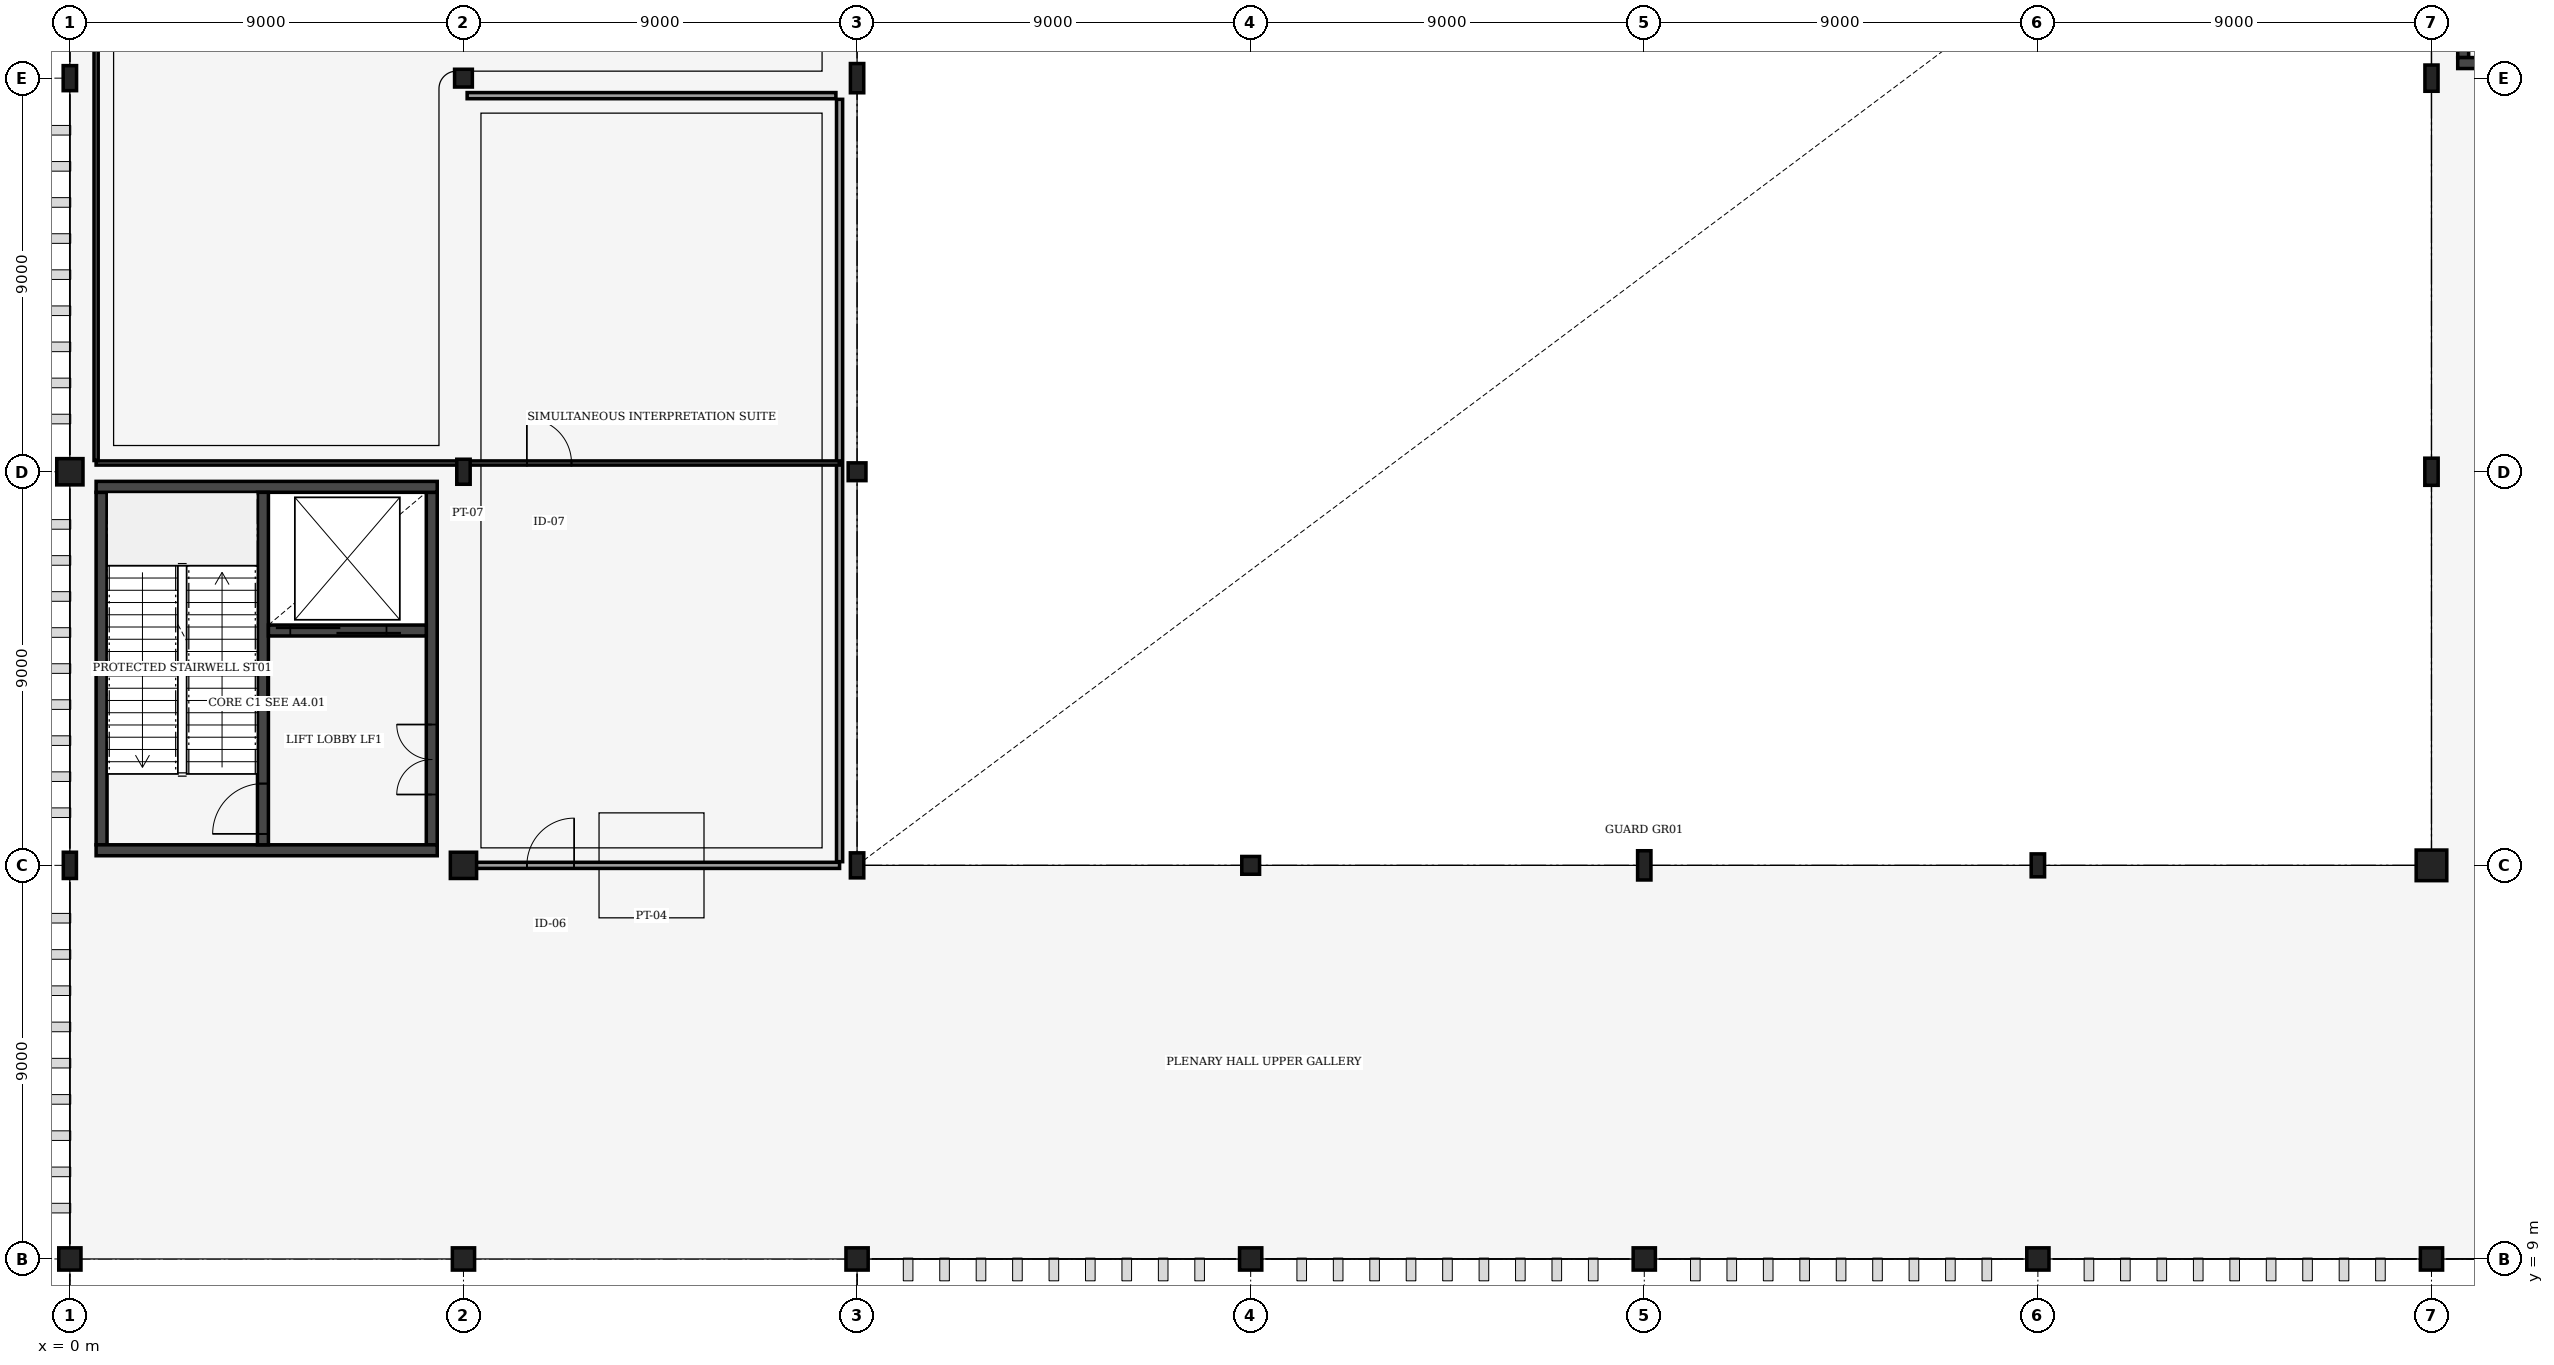
"""IFC4 building model, lengths in metres.
Left out: names, types, materials, properties, quantities, classifications, styles, units other than length and angle.
Written with IfcOpenShell. Run it as: python <this file> out.ifc"""

import sys

from ifc_helpers import new_model, si_unit, direction, frame, frame_2d, origin, origin_2d, place, context, subcontext, project, spatial, rectangle, hollow_circle, i_section, extrude, element, fill, save


model = new_model("IFC4")
c1 = context("Model", 3, precision=1e-05, world=origin(), true_north=direction((0.0, 1.0)))
c2 = subcontext(c1, "Body", "Model", "MODEL_VIEW")
j1 = project(units=[si_unit("LENGTHUNIT", "METRE"), si_unit("PLANEANGLEUNIT", "RADIAN")], contexts=[c1])
p1 = place(None, origin())
s1 = spatial("IfcSite", under=j1, at=p1, CompositionType="ELEMENT")
p2 = place(p1, origin())
s2 = spatial("IfcBuilding", under=s1, at=p2, CompositionType="ELEMENT")
p3 = place(p2, frame((0.0, 0.0, 6.0)))
s3 = spatial("IfcBuildingStorey", under=s2, at=p3, CompositionType="ELEMENT", Elevation=6.0)
p4 = place(p3, frame((0.0, 9.0, 0.0), z_axis=(0.0, 0.0, 1.0), x_axis=(1.0, 0.0, 0.0)))
e1 = element("IfcColumn", 1, at=p4, inside=s3, PredefinedType="COLUMN", context=c2, shape_type="SweptSolid", body=[
    extrude(hollow_circle(Radius=0.254, WallThickness=0.02, at=origin_2d()), origin(), (0.0, 0.0, 1.0), 6.0),
])
p5 = place(p3, frame((0.0, 18.0, 0.0), z_axis=(0.0, 0.0, 1.0), x_axis=(1.0, 0.0, 0.0)))
e2 = element("IfcColumn", 2, at=p5, inside=s3, PredefinedType="COLUMN", context=c2, shape_type="SweptSolid", body=[
    extrude(i_section(OverallWidth=0.3, OverallDepth=0.6, WebThickness=0.015, FlangeThickness=0.03, FilletRadius=0.027, at=origin_2d()), origin(), (0.0, 0.0, 1.0), 6.0),
])
p6 = place(p3, frame((0.0, 27.0, 0.0), z_axis=(0.0, 0.0, 1.0), x_axis=(1.0, 0.0, 0.0)))
e3 = element("IfcColumn", 3, at=p6, inside=s3, PredefinedType="COLUMN", context=c2, shape_type="SweptSolid", body=[
    extrude(rectangle(XDim=0.6, YDim=0.6, at=origin_2d()), origin(), (0.0, 0.0, 1.0), 6.0),
])
p7 = place(p3, frame((0.0, 36.0, 0.0), z_axis=(0.0, 0.0, 1.0), x_axis=(1.0, 0.0, 0.0)))
e4 = element("IfcColumn", 4, at=p7, inside=s3, PredefinedType="COLUMN", context=c2, shape_type="SweptSolid", body=[
    extrude(i_section(OverallWidth=0.306, OverallDepth=0.572, WebThickness=0.021, FlangeThickness=0.04, FilletRadius=0.027, at=origin_2d()), origin(), (0.0, 0.0, 1.0), 6.0),
])
p8 = place(p3, frame((9.0, 9.0, 0.0), z_axis=(0.0, 0.0, 1.0), x_axis=(1.0, 0.0, 0.0)))
e5 = element("IfcColumn", 5, at=p8, inside=s3, PredefinedType="COLUMN", context=c2, shape_type="SweptSolid", body=[
    extrude(hollow_circle(Radius=0.254, WallThickness=0.02, at=origin_2d()), origin(), (0.0, 0.0, 1.0), 6.0),
])
p9 = place(p3, frame((9.0, 18.0, 0.0), z_axis=(0.0, 0.0, 1.0), x_axis=(1.0, 0.0, 0.0)))
e6 = element("IfcColumn", 6, at=p9, inside=s3, PredefinedType="COLUMN", context=c2, shape_type="SweptSolid", body=[
    extrude(rectangle(XDim=0.6, YDim=0.6, at=origin_2d()), origin(), (0.0, 0.0, 1.0), 6.0),
])
p10 = place(p3, frame((9.0, 27.0, 0.0), z_axis=(0.0, 0.0, 1.0), x_axis=(1.0, 0.0, 0.0)))
e7 = element("IfcColumn", 7, at=p10, inside=s3, PredefinedType="COLUMN", context=c2, shape_type="SweptSolid", body=[
    extrude(i_section(OverallWidth=0.306, OverallDepth=0.572, WebThickness=0.021, FlangeThickness=0.04, FilletRadius=0.027, at=origin_2d()), origin(), (0.0, 0.0, 1.0), 6.0),
])
p11 = place(p3, frame((9.0, 36.0, 0.0), z_axis=(0.0, 0.0, 1.0), x_axis=(1.0, 0.0, 0.0)))
e8 = element("IfcColumn", 8, at=p11, inside=s3, PredefinedType="COLUMN", context=c2, shape_type="SweptSolid", body=[
    extrude(hollow_circle(Radius=0.203, WallThickness=0.016, at=origin_2d()), origin(), (0.0, 0.0, 1.0), 6.0),
])
p12 = place(p3, frame((18.0, 9.0, 0.0), z_axis=(0.0, 0.0, 1.0), x_axis=(1.0, 0.0, 0.0)))
e9 = element("IfcColumn", 9, at=p12, inside=s3, PredefinedType="COLUMN", context=c2, shape_type="SweptSolid", body=[
    extrude(hollow_circle(Radius=0.254, WallThickness=0.02, at=origin_2d()), origin(), (0.0, 0.0, 1.0), 6.0),
])
p13 = place(p3, frame((18.0, 18.0, 0.0), z_axis=(0.0, 0.0, 1.0), x_axis=(1.0, 0.0, 0.0)))
e10 = element("IfcColumn", 10, at=p13, inside=s3, PredefinedType="COLUMN", context=c2, shape_type="SweptSolid", body=[
    extrude(i_section(OverallWidth=0.306, OverallDepth=0.572, WebThickness=0.021, FlangeThickness=0.04, FilletRadius=0.027, at=origin_2d()), origin(), (0.0, 0.0, 1.0), 6.0),
])
p14 = place(p3, frame((18.0, 27.0, 0.0), z_axis=(0.0, 0.0, 1.0), x_axis=(1.0, 0.0, 0.0)))
e11 = element("IfcColumn", 11, at=p14, inside=s3, PredefinedType="COLUMN", context=c2, shape_type="SweptSolid", body=[
    extrude(hollow_circle(Radius=0.203, WallThickness=0.016, at=origin_2d()), origin(), (0.0, 0.0, 1.0), 6.0),
])
p15 = place(p3, frame((18.0, 36.0, 0.0), z_axis=(0.0, 0.0, 1.0), x_axis=(1.0, 0.0, 0.0)))
e12 = element("IfcColumn", 12, at=p15, inside=s3, PredefinedType="COLUMN", context=c2, shape_type="SweptSolid", body=[
    extrude(i_section(OverallWidth=0.305, OverallDepth=0.668, WebThickness=0.021, FlangeThickness=0.04, FilletRadius=0.027, at=origin_2d()), origin(), (0.0, 0.0, 1.0), 6.0),
])
p16 = place(p3, frame((27.0, 9.0, 0.0), z_axis=(0.0, 0.0, 1.0), x_axis=(1.0, 0.0, 0.0)))
e13 = element("IfcColumn", 13, at=p16, inside=s3, PredefinedType="COLUMN", context=c2, shape_type="SweptSolid", body=[
    extrude(hollow_circle(Radius=0.254, WallThickness=0.02, at=origin_2d()), origin(), (0.0, 0.0, 1.0), 6.0),
])
p17 = place(p3, frame((27.0, 18.0, 0.0), z_axis=(0.0, 0.0, 1.0), x_axis=(1.0, 0.0, 0.0)))
e14 = element("IfcColumn", 14, at=p17, inside=s3, PredefinedType="COLUMN", context=c2, shape_type="SweptSolid", body=[
    extrude(hollow_circle(Radius=0.203, WallThickness=0.016, at=origin_2d()), origin(), (0.0, 0.0, 1.0), 6.0),
])
p18 = place(p3, frame((36.0, 9.0, 0.0), z_axis=(0.0, 0.0, 1.0), x_axis=(1.0, 0.0, 0.0)))
e15 = element("IfcColumn", 15, at=p18, inside=s3, PredefinedType="COLUMN", context=c2, shape_type="SweptSolid", body=[
    extrude(hollow_circle(Radius=0.254, WallThickness=0.02, at=origin_2d()), origin(), (0.0, 0.0, 1.0), 6.0),
])
p19 = place(p3, frame((36.0, 18.0, 0.0), z_axis=(0.0, 0.0, 1.0), x_axis=(1.0, 0.0, 0.0)))
e16 = element("IfcColumn", 16, at=p19, inside=s3, PredefinedType="COLUMN", context=c2, shape_type="SweptSolid", body=[
    extrude(i_section(OverallWidth=0.305, OverallDepth=0.668, WebThickness=0.021, FlangeThickness=0.04, FilletRadius=0.027, at=origin_2d()), origin(), (0.0, 0.0, 1.0), 6.0),
])
p20 = place(p3, frame((45.0, 9.0, 0.0), z_axis=(0.0, 0.0, 1.0), x_axis=(1.0, 0.0, 0.0)))
e17 = element("IfcColumn", 17, at=p20, inside=s3, PredefinedType="COLUMN", context=c2, shape_type="SweptSolid", body=[
    extrude(hollow_circle(Radius=0.254, WallThickness=0.02, at=origin_2d()), origin(), (0.0, 0.0, 1.0), 6.0),
])
p21 = place(p3, frame((45.0, 18.0, 0.0), z_axis=(0.0, 0.0, 1.0), x_axis=(1.0, 0.0, 0.0)))
e18 = element("IfcColumn", 18, at=p21, inside=s3, PredefinedType="COLUMN", context=c2, shape_type="SweptSolid", body=[
    extrude(i_section(OverallWidth=0.306, OverallDepth=0.524, WebThickness=0.021, FlangeThickness=0.04, FilletRadius=0.027, at=origin_2d()), origin(), (0.0, 0.0, 1.0), 6.0),
])
p22 = place(p3, frame((54.0, 9.0, 0.0), z_axis=(0.0, 0.0, 1.0), x_axis=(1.0, 0.0, 0.0)))
e19 = element("IfcColumn", 19, at=p22, inside=s3, PredefinedType="COLUMN", context=c2, shape_type="SweptSolid", body=[
    extrude(hollow_circle(Radius=0.254, WallThickness=0.02, at=origin_2d()), origin(), (0.0, 0.0, 1.0), 6.0),
])
p23 = place(p3, frame((54.0, 18.0, 0.0), z_axis=(0.0, 0.0, 1.0), x_axis=(1.0, 0.0, 0.0)))
e20 = element("IfcColumn", 20, at=p23, inside=s3, PredefinedType="COLUMN", context=c2, shape_type="SweptSolid", body=[
    extrude(rectangle(XDim=0.7, YDim=0.7, at=origin_2d()), origin(), (0.0, 0.0, 1.0), 6.0),
])
p24 = place(p3, frame((54.0, 27.0, 0.0), z_axis=(0.0, 0.0, 1.0), x_axis=(1.0, 0.0, 0.0)))
e21 = element("IfcColumn", 21, at=p24, inside=s3, PredefinedType="COLUMN", context=c2, shape_type="SweptSolid", body=[
    extrude(i_section(OverallWidth=0.305, OverallDepth=0.62, WebThickness=0.021, FlangeThickness=0.04, FilletRadius=0.027, at=origin_2d()), origin(), (0.0, 0.0, 1.0), 6.0),
])
p25 = place(p3, frame((54.0, 36.0, 0.0), z_axis=(0.0, 0.0, 1.0), x_axis=(1.0, 0.0, 0.0)))
e22 = element("IfcColumn", 22, at=p25, inside=s3, PredefinedType="COLUMN", context=c2, shape_type="SweptSolid", body=[
    extrude(i_section(OverallWidth=0.3, OverallDepth=0.6, WebThickness=0.015, FlangeThickness=0.03, FilletRadius=0.027, at=origin_2d()), origin(), (0.0, 0.0, 1.0), 6.0),
])
p26 = place(p3, frame((0.725, 18.47, 0.0), z_axis=(0.0, 0.0, 1.0), x_axis=(0.0, 1.0, 0.0)))
e23 = element("IfcWall", 23, at=p26, inside=s3, PredefinedType="SHEAR", context=c2, shape_type="SweptSolid", body=[
    extrude(rectangle(XDim=8.06, YDim=0.25, at=frame_2d((4.03, 0.0))), origin(), (0.0, 0.0, 1.0), 5.7),
])
p27 = place(p3, frame((8.275, 18.47, 0.0), z_axis=(0.0, 0.0, 1.0), x_axis=(0.0, 1.0, 0.0)))
e24 = element("IfcWall", 24, at=p27, inside=s3, PredefinedType="SHEAR", context=c2, shape_type="SweptSolid", body=[
    extrude(rectangle(XDim=8.06, YDim=0.25, at=frame_2d((4.03, 0.0))), origin(), (0.0, 0.0, 1.0), 5.7),
])
p28 = place(p27, frame((1.15, 0.0, 0.0)))
e25 = element("IfcOpeningElement", 25, at=p28, cuts=e24, PredefinedType="OPENING", context=c2, shape_type="SweptSolid", body=[
    extrude(rectangle(XDim=1.6, YDim=2.2, at=frame_2d((0.8, 1.1))), frame((0.0, 0.135, 0.0), z_axis=(0.0, -1.0, 0.0), x_axis=(1.0, 0.0, 0.0)), (0.0, 0.0, 1.0), 0.27),
])
for number, where, z_axis, x_axis in (
    (26, (0.6, 18.345, 0.0), (0.0, 0.0, 1.0), (1.0, 0.0, 0.0)),
    (27, (0.6, 26.655, 0.0), (0.0, 0.0, 1.0), (1.0, 0.0, 0.0)),
):
    element("IfcWall", number, at=place(p3, frame(where, z_axis=z_axis, x_axis=x_axis)), inside=s3, PredefinedType="SHEAR", context=c2, shape_type="SweptSolid", body=[
        extrude(rectangle(XDim=7.8, YDim=0.25, at=frame_2d((3.9, 0.0))), origin(), (0.0, 0.0, 1.0), 5.7),
    ])
p29 = place(p3, frame((4.415, 18.47, 0.0), z_axis=(0.0, 0.0, 1.0), x_axis=(0.0, 1.0, 0.0)))
e28 = element("IfcWall", 28, at=p29, inside=s3, PredefinedType="SHEAR", context=c2, shape_type="SweptSolid", body=[
    extrude(rectangle(XDim=8.06, YDim=0.25, at=frame_2d((4.03, 0.0))), origin(), (0.0, 0.0, 1.0), 5.7),
])
p30 = place(p29, frame((0.25, 0.0, 0.0)))
e29 = element("IfcOpeningElement", 29, at=p30, cuts=e28, PredefinedType="OPENING", context=c2, shape_type="SweptSolid", body=[
    extrude(rectangle(XDim=1.15, YDim=2.15, at=frame_2d((0.575, 1.075))), frame((0.0, 0.135, 0.0), z_axis=(0.0, -1.0, 0.0), x_axis=(1.0, 0.0, 0.0)), (0.0, 0.0, 1.0), 0.27),
])
p31 = place(p3, frame((4.54, 23.37, 0.0), z_axis=(0.0, 0.0, 1.0), x_axis=(1.0, 0.0, 0.0)))
e30 = element("IfcWall", 30, at=p31, inside=s3, PredefinedType="SHEAR", context=c2, shape_type="SweptSolid", body=[
    extrude(rectangle(XDim=3.61, YDim=0.25, at=frame_2d((1.805, 0.0))), origin(), (0.0, 0.0, 1.0), 5.7),
])
p32 = place(p31, frame((0.5, 0.0, 0.0)))
e31 = element("IfcOpeningElement", 31, at=p32, cuts=e30, PredefinedType="OPENING", context=c2, shape_type="SweptSolid", body=[
    extrude(rectangle(XDim=2.2, YDim=2.4, at=frame_2d((1.1, 1.2))), frame((0.0, 0.135, 0.0), z_axis=(0.0, -1.0, 0.0), x_axis=(1.0, 0.0, 0.0)), (0.0, 0.0, 1.0), 0.27),
])
p33 = place(p3, frame((54.725, 36.47, 0.0), z_axis=(0.0, 0.0, 1.0), x_axis=(0.0, 1.0, 0.0)))
e32 = element("IfcWall", 32, at=p33, inside=s3, PredefinedType="SHEAR", context=c2, shape_type="SweptSolid", body=[
    extrude(rectangle(XDim=8.06, YDim=0.25, at=frame_2d((4.03, 0.0))), origin(), (0.0, 0.0, 1.0), 5.7),
])
p34 = place(p33, frame((1.15, 0.0, 0.0)))
e33 = element("IfcOpeningElement", 33, at=p34, cuts=e32, PredefinedType="OPENING", context=c2, shape_type="SweptSolid", body=[
    extrude(rectangle(XDim=1.6, YDim=2.2, at=frame_2d((0.8, 1.1))), frame((0.0, 0.135, 0.0), z_axis=(0.0, -1.0, 0.0), x_axis=(1.0, 0.0, 0.0)), (0.0, 0.0, 1.0), 0.27),
])
p35 = place(p3, frame((54.6, 36.345, 0.0), z_axis=(0.0, 0.0, 1.0), x_axis=(1.0, 0.0, 0.0)))
e34 = element("IfcWall", 34, at=p35, inside=s3, PredefinedType="SHEAR", context=c2, shape_type="SweptSolid", body=[
    extrude(rectangle(XDim=7.8, YDim=0.25, at=frame_2d((3.9, 0.0))), origin(), (0.0, 0.0, 1.0), 5.7),
])
p36 = place(p3, frame((9.0, 18.0, 0.0), z_axis=(0.0, 0.0, 1.0), x_axis=(1.0, 0.0, 0.0)))
e35 = element("IfcWall", 35, at=p36, inside=s3, PredefinedType="PARTITIONING", context=c2, shape_type="SweptSolid", body=[
    extrude(rectangle(XDim=8.6, YDim=0.14, at=frame_2d((4.3, 0.0))), origin(), (0.0, 0.0, 1.0), 4.85),
])
p37 = place(p36, frame((1.45, 0.0, 0.0)))
e36 = element("IfcOpeningElement", 36, at=p37, cuts=e35, PredefinedType="OPENING", context=c2, shape_type="SweptSolid", body=[
    extrude(rectangle(XDim=1.08, YDim=2.18, at=frame_2d((0.54, 1.09))), frame((0.0, 0.08, 0.0), z_axis=(0.0, -1.0, 0.0), x_axis=(1.0, 0.0, 0.0)), (0.0, 0.0, 1.0), 0.16),
])
p38 = place(p3, frame((9.084, 35.6, 0.0), z_axis=(0.0, 0.0, 1.0), x_axis=(1.0, 0.0, 0.0)))
e37 = element("IfcWall", 37, at=p38, inside=s3, PredefinedType="PARTITIONING", context=c2, shape_type="SweptSolid", body=[
    extrude(rectangle(XDim=8.432, YDim=0.14, at=frame_2d((4.216, 0.0))), origin(), (0.0, 0.0, 1.0), 4.85),
])
p39 = place(p3, frame((17.6, 18.084, 0.0), z_axis=(0.0, 0.0, 1.0), x_axis=(0.0, 1.0, 0.0)))
e38 = element("IfcWall", 38, at=p39, inside=s3, PredefinedType="PARTITIONING", context=c2, shape_type="SweptSolid", body=[
    extrude(rectangle(XDim=17.432, YDim=0.14, at=frame_2d((8.716, 0.0))), origin(), (0.0, 0.0, 1.0), 4.85),
])
p40 = place(p3, frame((0.6, 27.2, 0.0), z_axis=(0.0, 0.0, 1.0), x_axis=(1.0, 0.0, 0.0)))
e39 = element("IfcWall", 39, at=p40, inside=s3, PredefinedType="PARTITIONING", context=c2, shape_type="SweptSolid", body=[
    extrude(rectangle(XDim=17.0, YDim=0.095, at=frame_2d((8.5, 0.0))), origin(), (0.0, 0.0, 1.0), 4.85),
])
p41 = place(p40, frame((9.85, 0.0, 0.0)))
e40 = element("IfcOpeningElement", 40, at=p41, cuts=e39, PredefinedType="OPENING", context=c2, shape_type="SweptSolid", body=[
    extrude(rectangle(XDim=1.02, YDim=2.15, at=frame_2d((0.51, 1.075))), frame((0.0, 0.057, 0.0), z_axis=(0.0, -1.0, 0.0), x_axis=(1.0, 0.0, 0.0)), (0.0, 0.0, 1.0), 0.115),
])
p42 = place(p3, frame((0.6, 27.257, 0.0), z_axis=(0.0, 0.0, 1.0), x_axis=(0.0, 1.0, 0.0)))
e41 = element("IfcWall", 41, at=p42, inside=s3, PredefinedType="PARTITIONING", context=c2, shape_type="SweptSolid", body=[
    extrude(rectangle(XDim=26.086, YDim=0.095, at=frame_2d((13.043, 0.0))), origin(), (0.0, 0.0, 1.0), 4.85),
])
p43 = place(p30, origin())
e42 = element("IfcDoor", 42, at=p43, inside=s3, OperationType="SINGLE_SWING_LEFT", PredefinedType="DOOR", context=c2, shape_type="SweptSolid", body=[
    extrude(rectangle(XDim=1.15, YDim=2.15, at=frame_2d((0.575, 1.075))), frame((0.0, 0.025, 0.0), z_axis=(0.0, -1.0, 0.0), x_axis=(1.0, 0.0, 0.0)), (0.0, 0.0, 1.0), 0.05),
])
fill(e29, e42)
p44 = place(p32, origin())
e43 = element("IfcDoor", 43, at=p44, inside=s3, OperationType="DOUBLE_DOOR_SLIDING", PredefinedType="DOOR", context=c2, shape_type="SweptSolid", body=[
    extrude(rectangle(XDim=2.2, YDim=2.4, at=frame_2d((1.1, 1.2))), frame((0.0, 0.025, 0.0), z_axis=(0.0, -1.0, 0.0), x_axis=(1.0, 0.0, 0.0)), (0.0, 0.0, 1.0), 0.05),
])
fill(e31, e43)
p45 = place(p28, origin())
e44 = element("IfcDoor", 44, at=p45, inside=s3, OperationType="DOUBLE_DOOR_SINGLE_SWING", PredefinedType="DOOR", context=c2, shape_type="SweptSolid", body=[
    extrude(rectangle(XDim=1.6, YDim=2.2, at=frame_2d((0.8, 1.1))), frame((0.0, 0.025, 0.0), z_axis=(0.0, -1.0, 0.0), x_axis=(1.0, 0.0, 0.0)), (0.0, 0.0, 1.0), 0.05),
])
fill(e25, e44)
p46 = place(p37, origin())
e45 = element("IfcDoor", 45, at=p46, inside=s3, OperationType="SINGLE_SWING_RIGHT", PredefinedType="DOOR", context=c2, shape_type="SweptSolid", body=[
    extrude(rectangle(XDim=1.08, YDim=2.18, at=frame_2d((0.54, 1.09))), frame((0.0, 0.025, 0.0), z_axis=(0.0, -1.0, 0.0), x_axis=(1.0, 0.0, 0.0)), (0.0, 0.0, 1.0), 0.05),
])
fill(e36, e45)
p47 = place(p41, origin())
e46 = element("IfcDoor", 46, at=p47, inside=s3, OperationType="SINGLE_SWING_LEFT", PredefinedType="DOOR", context=c2, shape_type="SweptSolid", body=[
    extrude(rectangle(XDim=1.02, YDim=2.15, at=frame_2d((0.51, 1.075))), frame((0.0, 0.025, 0.0), z_axis=(0.0, -1.0, 0.0), x_axis=(1.0, 0.0, 0.0)), (0.0, 0.0, 1.0), 0.05),
])
fill(e40, e46)
save(model, sys.argv[1])
